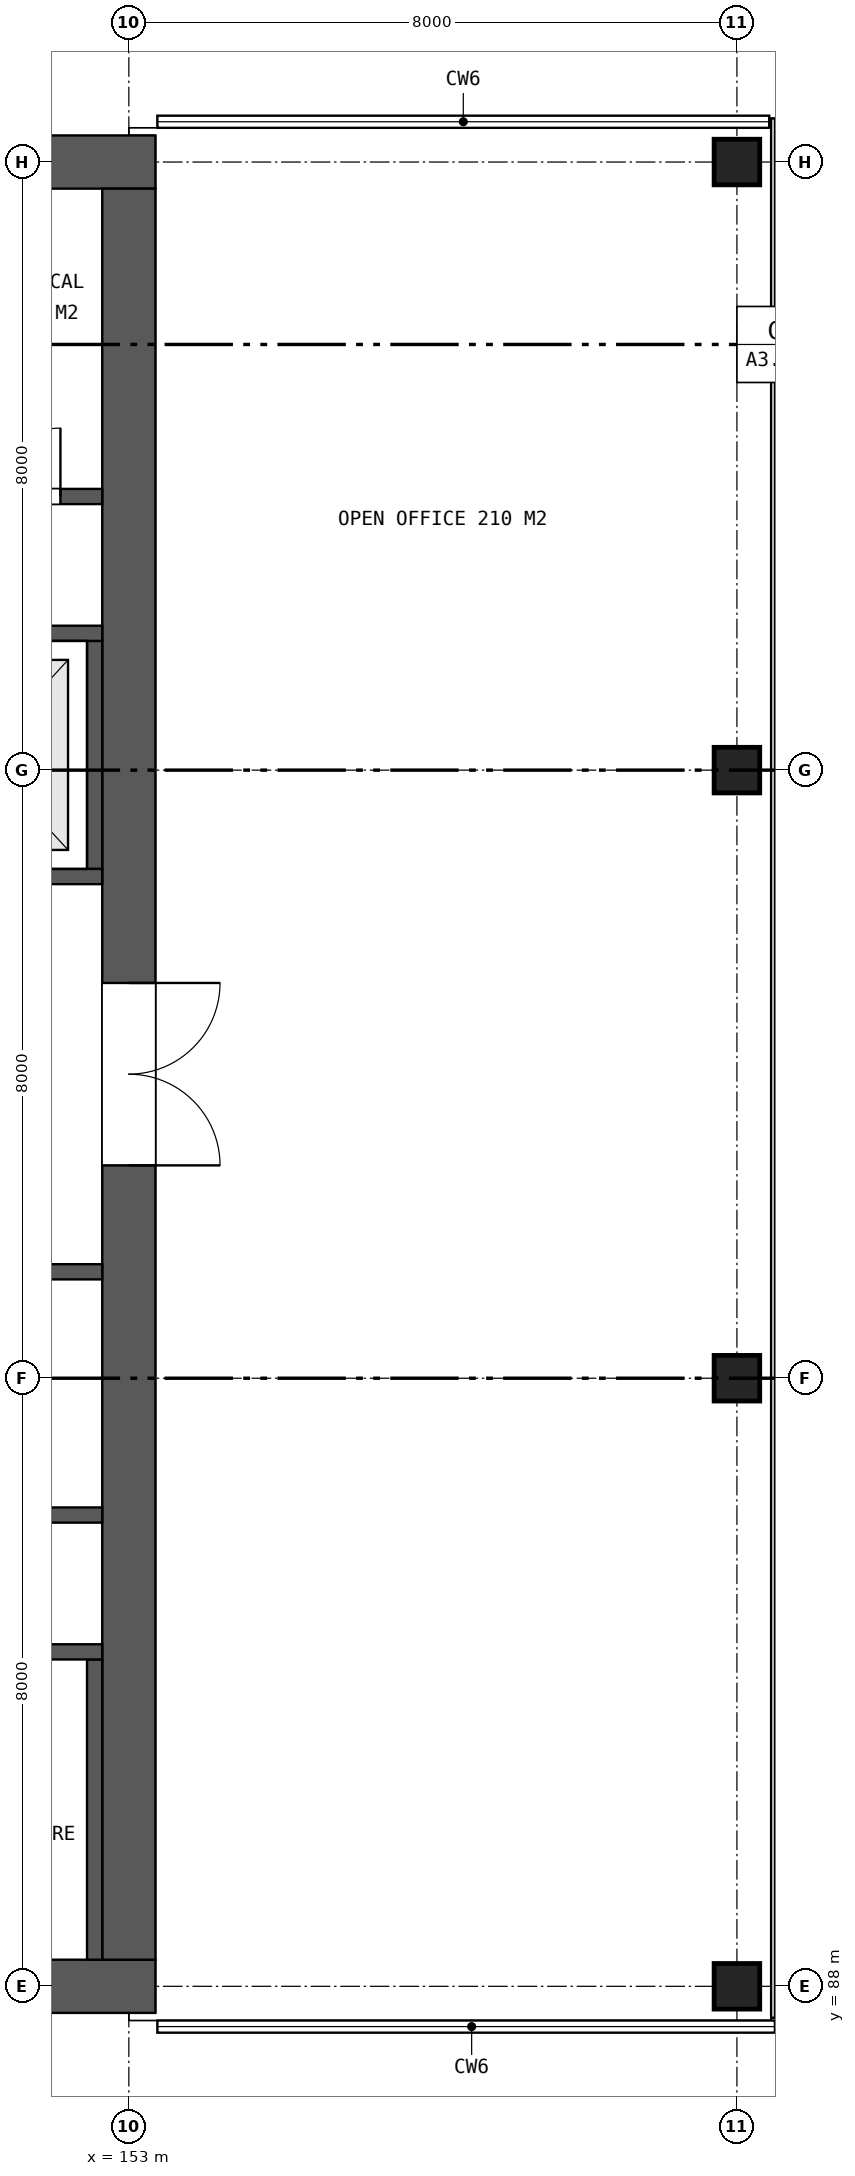
"""IFC4 building model, lengths in metres.
Left out: names, types, materials, properties, quantities, classifications, styles, units other than length and angle.
Written with IfcOpenShell. Run it as: python <this file> out.ifc"""

import sys

from ifc_helpers import new_model, si_unit, direction, frame, frame_2d, origin, origin_2d, place, context, subcontext, project, spatial, rectangle, extrude, element, fill, save


model = new_model("IFC4")
c1 = context("Model", 3, precision=1e-05, world=origin(), true_north=direction((0.0, 1.0)))
c2 = subcontext(c1, "Body", "Model", "MODEL_VIEW")
j1 = project(units=[si_unit("LENGTHUNIT", "METRE"), si_unit("PLANEANGLEUNIT", "RADIAN")], contexts=[c1])
p1 = place(None, origin())
s1 = spatial("IfcSite", under=j1, at=p1, CompositionType="ELEMENT")
p2 = place(p1, origin())
s2 = spatial("IfcBuilding", under=s1, at=p2, CompositionType="ELEMENT")
p3 = place(p2, frame((0.0, 0.0, 167.3)))
s3 = spatial("IfcBuildingStorey", under=s2, at=p3, CompositionType="ELEMENT", Elevation=167.3)
for number, where, z_axis, x_axis in (
    (1, (161.0, 88.0, 0.0), (0.0, 0.0, 1.0), (1.0, 0.0, 0.0)),
    (2, (161.0, 96.0, 0.0), (0.0, 0.0, 1.0), (1.0, 0.0, 0.0)),
    (3, (161.0, 104.0, 0.0), (0.0, 0.0, 1.0), (1.0, 0.0, 0.0)),
    (4, (161.0, 112.0, 0.0), (0.0, 0.0, 1.0), (1.0, 0.0, 0.0)),
):
    element("IfcColumn", number, at=place(p3, frame(where, z_axis=z_axis, x_axis=x_axis)), inside=s3, PredefinedType="COLUMN", context=c2, shape_type="SweptSolid", body=[
        extrude(rectangle(XDim=0.6, YDim=0.6, at=origin_2d()), origin(), (0.0, 0.0, 1.0), 4.2),
    ])
p4 = place(p3, frame((144.1, 112.0, 0.0), z_axis=(0.0, 0.0, 1.0), x_axis=(1.0, 0.0, 0.0)))
e5 = element("IfcWall", 5, at=p4, inside=s3, PredefinedType="SHEAR", context=c2, shape_type="SweptSolid", body=[
    extrude(rectangle(XDim=9.25, YDim=0.7, at=frame_2d((4.625, 0.0))), origin(), (0.0, 0.0, 1.0), 4.2),
])
p5 = place(p3, frame((144.1, 88.0, 0.0), z_axis=(0.0, 0.0, 1.0), x_axis=(1.0, 0.0, 0.0)))
e6 = element("IfcWall", 6, at=p5, inside=s3, PredefinedType="SHEAR", context=c2, shape_type="SweptSolid", body=[
    extrude(rectangle(XDim=9.25, YDim=0.7, at=frame_2d((4.625, 0.0))), origin(), (0.0, 0.0, 1.0), 4.2),
])
p6 = place(p5, frame((1.876, 0.0, 1.5)))
e7 = element("IfcOpeningElement", 7, at=p6, cuts=e6, PredefinedType="OPENING", context=c2, shape_type="SweptSolid", body=[
    extrude(rectangle(XDim=0.7, YDim=0.9, at=frame_2d((0.35, 0.45))), frame((0.0, 0.36, 0.0), z_axis=(0.0, -1.0, 0.0), x_axis=(1.0, 0.0, 0.0)), (0.0, 0.0, 1.0), 0.72),
])
p7 = place(p5, frame((4.163, 0.0, 1.5)))
e8 = element("IfcOpeningElement", 8, at=p7, cuts=e6, PredefinedType="OPENING", context=c2, shape_type="SweptSolid", body=[
    extrude(rectangle(XDim=0.7, YDim=0.9, at=frame_2d((0.35, 0.45))), frame((0.0, 0.36, 0.0), z_axis=(0.0, -1.0, 0.0), x_axis=(1.0, 0.0, 0.0)), (0.0, 0.0, 1.0), 0.72),
])
p8 = place(p3, frame((153.0, 88.35, 0.0), z_axis=(0.0, 0.0, 1.0), x_axis=(0.0, 1.0, 0.0)))
e9 = element("IfcWall", 9, at=p8, inside=s3, PredefinedType="SHEAR", context=c2, shape_type="SweptSolid", body=[
    extrude(rectangle(XDim=23.3, YDim=0.7, at=frame_2d((11.65, 0.0))), origin(), (0.0, 0.0, 1.0), 4.2),
])
p9 = place(p8, frame((10.45, 0.0, 0.0)))
e10 = element("IfcOpeningElement", 10, at=p9, cuts=e9, PredefinedType="OPENING", context=c2, shape_type="SweptSolid", body=[
    extrude(rectangle(XDim=2.4, YDim=2.4, at=frame_2d((1.2, 1.2))), frame((0.0, 0.36, 0.0), z_axis=(0.0, -1.0, 0.0), x_axis=(1.0, 0.0, 0.0)), (0.0, 0.0, 1.0), 0.72),
])
p10 = place(p3, frame((152.55, 102.7, 0.0), z_axis=(0.0, 0.0, 1.0), x_axis=(0.0, 1.0, 0.0)))
e11 = element("IfcWall", 11, at=p10, inside=s3, PredefinedType="SHEAR", context=c2, shape_type="SweptSolid", body=[
    extrude(rectangle(XDim=3.0, YDim=0.2, at=frame_2d((1.5, 0.0))), origin(), (0.0, 0.0, 1.0), 4.2),
])
p11 = place(p3, frame((140.6, 102.6, 0.0), z_axis=(0.0, 0.0, 1.0), x_axis=(1.0, 0.0, 0.0)))
e12 = element("IfcWall", 12, at=p11, inside=s3, PredefinedType="SHEAR", context=c2, shape_type="SweptSolid", body=[
    extrude(rectangle(XDim=12.05, YDim=0.2, at=frame_2d((6.025, 0.0))), origin(), (0.0, 0.0, 1.0), 4.2),
])
p12 = place(p11, frame((0.85, 0.0, 0.0)))
e13 = element("IfcOpeningElement", 13, at=p12, cuts=e12, PredefinedType="OPENING", context=c2, shape_type="SweptSolid", body=[
    extrude(rectangle(XDim=1.4, YDim=2.1, at=frame_2d((0.7, 1.05))), frame((0.0, 0.11, 0.0), z_axis=(0.0, -1.0, 0.0), x_axis=(1.0, 0.0, 0.0)), (0.0, 0.0, 1.0), 0.22),
])
p13 = place(p11, frame((3.8, 0.0, 0.0)))
e14 = element("IfcOpeningElement", 14, at=p13, cuts=e12, PredefinedType="OPENING", context=c2, shape_type="SweptSolid", body=[
    extrude(rectangle(XDim=1.4, YDim=2.1, at=frame_2d((0.7, 1.05))), frame((0.0, 0.11, 0.0), z_axis=(0.0, -1.0, 0.0), x_axis=(1.0, 0.0, 0.0)), (0.0, 0.0, 1.0), 0.22),
])
p14 = place(p11, frame((6.8, 0.0, 0.0)))
e15 = element("IfcOpeningElement", 15, at=p14, cuts=e12, PredefinedType="OPENING", context=c2, shape_type="SweptSolid", body=[
    extrude(rectangle(XDim=1.4, YDim=2.1, at=frame_2d((0.7, 1.05))), frame((0.0, 0.11, 0.0), z_axis=(0.0, -1.0, 0.0), x_axis=(1.0, 0.0, 0.0)), (0.0, 0.0, 1.0), 0.22),
])
p15 = place(p11, frame((9.775, 0.0, 0.0)))
e16 = element("IfcOpeningElement", 16, at=p15, cuts=e12, PredefinedType="OPENING", context=c2, shape_type="SweptSolid", body=[
    extrude(rectangle(XDim=1.4, YDim=2.1, at=frame_2d((0.7, 1.05))), frame((0.0, 0.11, 0.0), z_axis=(0.0, -1.0, 0.0), x_axis=(1.0, 0.0, 0.0)), (0.0, 0.0, 1.0), 0.22),
])
p16 = place(p3, frame((140.6, 97.4, 0.0), z_axis=(0.0, 0.0, 1.0), x_axis=(1.0, 0.0, 0.0)))
e17 = element("IfcWall", 17, at=p16, inside=s3, PredefinedType="SHEAR", context=c2, shape_type="SweptSolid", body=[
    extrude(rectangle(XDim=12.05, YDim=0.2, at=frame_2d((6.025, 0.0))), origin(), (0.0, 0.0, 1.0), 4.2),
])
p17 = place(p16, frame((3.866, 0.0, 0.0)))
e18 = element("IfcOpeningElement", 18, at=p17, cuts=e17, PredefinedType="OPENING", context=c2, shape_type="SweptSolid", body=[
    extrude(rectangle(XDim=0.9, YDim=2.1, at=frame_2d((0.45, 1.05))), frame((0.0, 0.11, 0.0), z_axis=(0.0, -1.0, 0.0), x_axis=(1.0, 0.0, 0.0)), (0.0, 0.0, 1.0), 0.22),
])
p18 = place(p16, frame((9.854, 0.0, 0.0)))
e19 = element("IfcOpeningElement", 19, at=p18, cuts=e17, PredefinedType="OPENING", context=c2, shape_type="SweptSolid", body=[
    extrude(rectangle(XDim=0.9, YDim=2.1, at=frame_2d((0.45, 1.05))), frame((0.0, 0.11, 0.0), z_axis=(0.0, -1.0, 0.0), x_axis=(1.0, 0.0, 0.0)), (0.0, 0.0, 1.0), 0.22),
])
p19 = place(p3, frame((137.3, 105.8, 0.0), z_axis=(0.0, 0.0, 1.0), x_axis=(1.0, 0.0, 0.0)))
e20 = element("IfcWall", 20, at=p19, inside=s3, PredefinedType="SHEAR", context=c2, shape_type="SweptSolid", body=[
    extrude(rectangle(XDim=15.35, YDim=0.2, at=frame_2d((7.675, 0.0))), origin(), (0.0, 0.0, 1.0), 4.2),
])
p20 = place(p19, frame((0.95, 0.0, 0.0)))
e21 = element("IfcOpeningElement", 21, at=p20, cuts=e20, PredefinedType="OPENING", context=c2, shape_type="SweptSolid", body=[
    extrude(rectangle(XDim=1.1, YDim=2.1, at=frame_2d((0.55, 1.05))), frame((0.0, 0.11, 0.0), z_axis=(0.0, -1.0, 0.0), x_axis=(1.0, 0.0, 0.0)), (0.0, 0.0, 1.0), 0.22),
])
p21 = place(p3, frame((144.1, 107.6, 0.0), z_axis=(0.0, 0.0, 1.0), x_axis=(1.0, 0.0, 0.0)))
e22 = element("IfcWall", 22, at=p21, inside=s3, PredefinedType="SHEAR", context=c2, shape_type="SweptSolid", body=[
    extrude(rectangle(XDim=8.55, YDim=0.2, at=frame_2d((4.275, 0.0))), origin(), (0.0, 0.0, 1.0), 4.2),
])
p22 = place(p21, frame((1.325, 0.0, 0.0)))
e23 = element("IfcOpeningElement", 23, at=p22, cuts=e22, PredefinedType="OPENING", context=c2, shape_type="SweptSolid", body=[
    extrude(rectangle(XDim=1.1, YDim=2.1, at=frame_2d((0.55, 1.05))), frame((0.0, 0.11, 0.0), z_axis=(0.0, -1.0, 0.0), x_axis=(1.0, 0.0, 0.0)), (0.0, 0.0, 1.0), 0.22),
])
p23 = place(p21, frame((7.1, 0.0, 0.0)))
e24 = element("IfcOpeningElement", 24, at=p23, cuts=e22, PredefinedType="OPENING", context=c2, shape_type="SweptSolid", body=[
    extrude(rectangle(XDim=0.9, YDim=2.1, at=frame_2d((0.45, 1.05))), frame((0.0, 0.11, 0.0), z_axis=(0.0, -1.0, 0.0), x_axis=(1.0, 0.0, 0.0)), (0.0, 0.0, 1.0), 0.22),
])
p24 = place(p3, frame((137.3, 94.2, 0.0), z_axis=(0.0, 0.0, 1.0), x_axis=(1.0, 0.0, 0.0)))
e25 = element("IfcWall", 25, at=p24, inside=s3, PredefinedType="SHEAR", context=c2, shape_type="SweptSolid", body=[
    extrude(rectangle(XDim=15.35, YDim=0.2, at=frame_2d((7.675, 0.0))), origin(), (0.0, 0.0, 1.0), 4.2),
])
p25 = place(p24, frame((0.95, 0.0, 0.0)))
e26 = element("IfcOpeningElement", 26, at=p25, cuts=e25, PredefinedType="OPENING", context=c2, shape_type="SweptSolid", body=[
    extrude(rectangle(XDim=1.1, YDim=2.1, at=frame_2d((0.55, 1.05))), frame((0.0, 0.11, 0.0), z_axis=(0.0, -1.0, 0.0), x_axis=(1.0, 0.0, 0.0)), (0.0, 0.0, 1.0), 0.22),
])
p26 = place(p3, frame((152.55, 88.35, 0.0), z_axis=(0.0, 0.0, 1.0), x_axis=(0.0, 1.0, 0.0)))
e27 = element("IfcWall", 27, at=p26, inside=s3, PredefinedType="SHEAR", context=c2, shape_type="SweptSolid", body=[
    extrude(rectangle(XDim=3.95, YDim=0.2, at=frame_2d((1.975, 0.0))), origin(), (0.0, 0.0, 1.0), 4.2),
])
p27 = place(p3, frame((144.1, 92.4, 0.0), z_axis=(0.0, 0.0, 1.0), x_axis=(1.0, 0.0, 0.0)))
e28 = element("IfcWall", 28, at=p27, inside=s3, PredefinedType="SHEAR", context=c2, shape_type="SweptSolid", body=[
    extrude(rectangle(XDim=8.55, YDim=0.2, at=frame_2d((4.275, 0.0))), origin(), (0.0, 0.0, 1.0), 4.2),
])
p28 = place(p27, frame((0.1, 0.0, 0.0)))
e29 = element("IfcOpeningElement", 29, at=p28, cuts=e28, PredefinedType="OPENING", context=c2, shape_type="SweptSolid", body=[
    extrude(rectangle(XDim=0.8, YDim=2.1, at=frame_2d((0.4, 1.05))), frame((0.0, 0.11, 0.0), z_axis=(0.0, -1.0, 0.0), x_axis=(1.0, 0.0, 0.0)), (0.0, 0.0, 1.0), 0.22),
])
p29 = place(p27, frame((1.726, 0.0, 0.0)))
e30 = element("IfcOpeningElement", 30, at=p29, cuts=e28, PredefinedType="OPENING", context=c2, shape_type="SweptSolid", body=[
    extrude(rectangle(XDim=1.0, YDim=2.1, at=frame_2d((0.5, 1.05))), frame((0.0, 0.11, 0.0), z_axis=(0.0, -1.0, 0.0), x_axis=(1.0, 0.0, 0.0)), (0.0, 0.0, 1.0), 0.22),
])
p30 = place(p27, frame((4.063, 0.0, 0.0)))
e31 = element("IfcOpeningElement", 31, at=p30, cuts=e28, PredefinedType="OPENING", context=c2, shape_type="SweptSolid", body=[
    extrude(rectangle(XDim=0.9, YDim=2.1, at=frame_2d((0.45, 1.05))), frame((0.0, 0.11, 0.0), z_axis=(0.0, -1.0, 0.0), x_axis=(1.0, 0.0, 0.0)), (0.0, 0.0, 1.0), 0.22),
])
p31 = place(p27, frame((6.6, 0.0, 0.0)))
e32 = element("IfcOpeningElement", 32, at=p31, cuts=e28, PredefinedType="OPENING", context=c2, shape_type="SweptSolid", body=[
    extrude(rectangle(XDim=0.9, YDim=2.1, at=frame_2d((0.45, 1.05))), frame((0.0, 0.11, 0.0), z_axis=(0.0, -1.0, 0.0), x_axis=(1.0, 0.0, 0.0)), (0.0, 0.0, 1.0), 0.22),
])
p32 = place(p9, frame((2.4, 0.0, 0.0), z_axis=(0.0, 0.0, 1.0), x_axis=(-1.0, 0.0, 0.0)))
e33 = element("IfcDoor", 33, at=p32, inside=s3, OperationType="DOUBLE_DOOR_SINGLE_SWING", PredefinedType="DOOR", context=c2, shape_type="SweptSolid", body=[
    extrude(rectangle(XDim=2.4, YDim=2.4, at=frame_2d((1.2, 1.2))), frame((0.0, 0.025, 0.0), z_axis=(0.0, -1.0, 0.0), x_axis=(1.0, 0.0, 0.0)), (0.0, 0.0, 1.0), 0.05),
])
fill(e10, e33)
p33 = place(p23, origin())
e34 = element("IfcDoor", 34, at=p33, inside=s3, OperationType="SINGLE_SWING_RIGHT", PredefinedType="DOOR", context=c2, shape_type="SweptSolid", body=[
    extrude(rectangle(XDim=0.9, YDim=2.1, at=frame_2d((0.45, 1.05))), frame((0.0, 0.025, 0.0), z_axis=(0.0, -1.0, 0.0), x_axis=(1.0, 0.0, 0.0)), (0.0, 0.0, 1.0), 0.05),
])
fill(e24, e34)
save(model, sys.argv[1])
